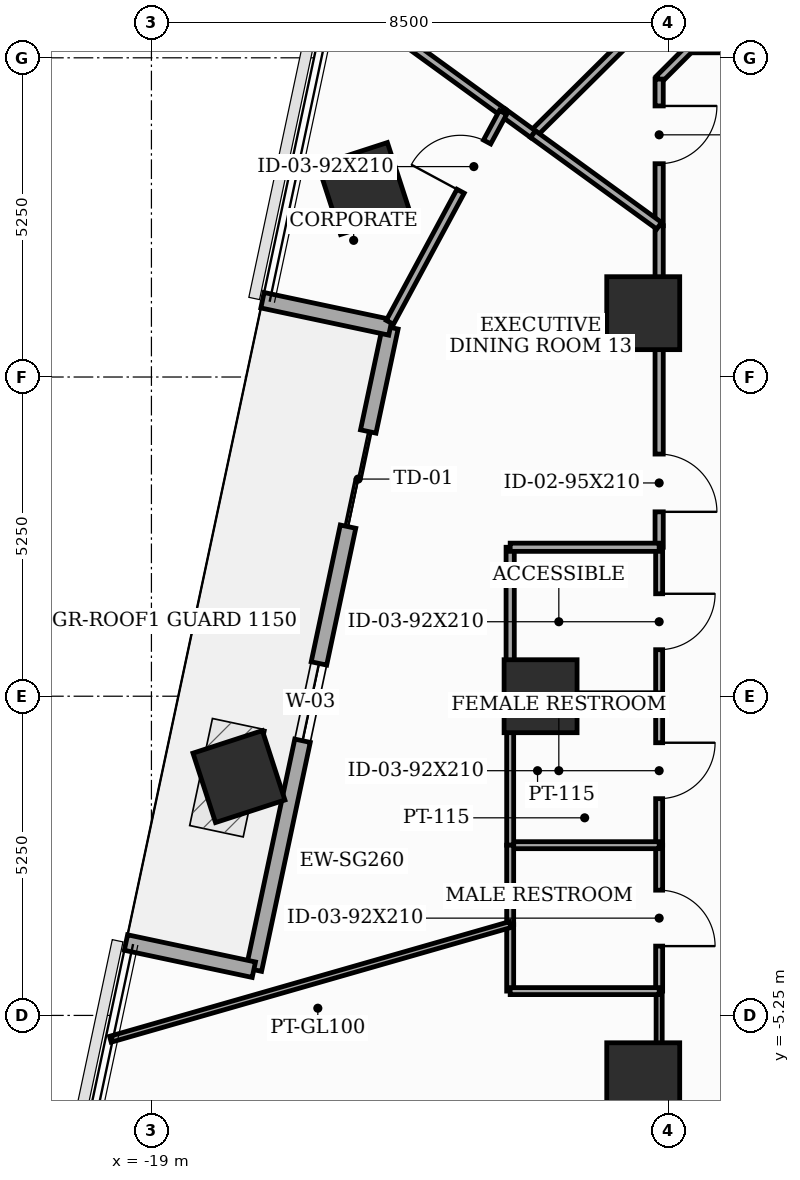
"""IFC4 building model, lengths in metres.
Left out: names, types, materials, properties, quantities, classifications, styles, units other than length and angle.
Written with IfcOpenShell. Run it as: python <this file> out.ifc"""

import sys

from ifc_helpers import new_model, si_unit, direction, frame, frame_2d, origin, origin_2d, place, context, subcontext, project, spatial, rectangle, extrude, element, fill, save


model = new_model("IFC4")
c1 = context("Model", 3, precision=1e-05, world=origin(), true_north=direction((0.0, 1.0)))
c2 = subcontext(c1, "Body", "Model", "MODEL_VIEW")
j1 = project(units=[si_unit("LENGTHUNIT", "METRE"), si_unit("PLANEANGLEUNIT", "RADIAN")], contexts=[c1])
p1 = place(None, origin())
s1 = spatial("IfcSite", under=j1, at=p1, CompositionType="ELEMENT")
p2 = place(p1, origin())
s2 = spatial("IfcBuilding", under=s1, at=p2, CompositionType="ELEMENT")
p3 = place(p2, frame((0.0, 0.0, 112.5)))
s3 = spatial("IfcBuildingStorey", under=s2, at=p3, CompositionType="ELEMENT", Elevation=112.5)
for number, where, z_axis, x_axis in (
    (1, (-10.912, 6.3, 0.0), (0.0, 0.0, 1.0), (1.0, 0.0, 0.0)),
    (2, (-12.6, 0.0, 0.0), (0.0, 0.0, 1.0), (1.0, 0.0, 0.0)),
    (3, (-10.912, -6.3, 0.0), (0.0, 0.0, 1.0), (1.0, 0.0, 0.0)),
    (4, (-15.505, 8.35, 0.0), (0.0, 0.0, 1.0), (0.951, 0.309, 0.0)),
    (5, (-17.561, -1.322, 0.0), (0.0, 0.0, 1.0), (0.951, 0.309, 0.0)),
):
    element("IfcColumn", number, at=place(p3, frame(where, z_axis=z_axis, x_axis=x_axis)), inside=s3, PredefinedType="COLUMN", context=c2, shape_type="SweptSolid", body=[
        extrude(rectangle(XDim=1.2, YDim=1.2, at=origin_2d()), origin(), (0.0, 0.0, 1.0), 3.7),
    ])
p4 = place(p3, frame((-15.07, 6.066, 0.0), z_axis=(0.0, 0.0, 1.0), x_axis=(-0.207900120229, -0.978150060067, 0.0)))
e6 = element("IfcWall", 6, at=p4, inside=s3, PredefinedType="SOLIDWALL", context=c2, shape_type="SweptSolid", body=[
    extrude(rectangle(XDim=10.8, YDim=0.26, at=frame_2d((5.4, 0.0))), origin(), (0.0, 0.0, 1.0), 3.5),
])
p5 = place(p4, frame((1.75, 0.0, 0.0)))
e7 = element("IfcOpeningElement", 7, at=p5, cuts=e6, PredefinedType="OPENING", context=c2, shape_type="SweptSolid", body=[
    extrude(rectangle(XDim=1.6, YDim=2.08, at=frame_2d((0.8, 1.04))), frame((0.0, 0.14, 0.0), z_axis=(0.0, -1.0, 0.0), x_axis=(1.0, 0.0, 0.0)), (0.0, 0.0, 1.0), 0.28),
])
p6 = place(p4, frame((5.65, 0.0, 0.85)))
e8 = element("IfcOpeningElement", 8, at=p6, cuts=e6, PredefinedType="OPENING", context=c2, shape_type="SweptSolid", body=[
    extrude(rectangle(XDim=1.3, YDim=1.25, at=frame_2d((0.65, 0.625))), frame((0.0, 0.14, 0.0), z_axis=(0.0, -1.0, 0.0), x_axis=(1.0, 0.0, 0.0)), (0.0, 0.0, 1.0), 0.28),
])
for number, where, z_axis, x_axis in (
    (9, (-17.173, 6.513, 0.0), (0.0, 0.0, 1.0), (0.978, -0.208, 0.0)),
    (10, (-17.316, -4.498, 0.0), (0.0, 0.0, 1.0), (-0.978, 0.208, 0.0)),
):
    element("IfcWall", number, at=place(p3, frame(where, z_axis=z_axis, x_axis=x_axis)), inside=s3, PredefinedType="SOLIDWALL", context=c2, shape_type="SweptSolid", body=[
        extrude(rectangle(XDim=2.15, YDim=0.26, at=frame_2d((1.075, 0.0))), origin(), (0.0, 0.0, 1.0), 3.5),
    ])
p7 = place(p3, frame((-10.65, 0.0, 0.0), z_axis=(0.0, 0.0, 1.0), x_axis=(0.0, -1.0, 0.0)))
e11 = element("IfcWall", 11, at=p7, inside=s3, PredefinedType="PARTITIONING", context=c2, shape_type="SweptSolid", body=[
    extrude(rectangle(XDim=2.45, YDim=0.115, at=frame_2d((1.225, 0.0))), origin(), (0.0, 0.0, 1.0), 2.785),
])
p8 = place(p7, frame((0.765, 0.0, 0.0)))
e12 = element("IfcOpeningElement", 12, at=p8, cuts=e11, PredefinedType="OPENING", context=c2, shape_type="SweptSolid", body=[
    extrude(rectangle(XDim=0.92, YDim=2.1, at=frame_2d((0.46, 1.05))), frame((0.0, 0.067, 0.0), z_axis=(0.0, -1.0, 0.0), x_axis=(1.0, 0.0, 0.0)), (0.0, 0.0, 1.0), 0.135),
])
p9 = place(p3, frame((-10.65, -2.45, 0.0), z_axis=(0.0, 0.0, 1.0), x_axis=(0.0, -1.0, 0.0)))
e13 = element("IfcWall", 13, at=p9, inside=s3, PredefinedType="PARTITIONING", context=c2, shape_type="SweptSolid", body=[
    extrude(rectangle(XDim=2.4, YDim=0.115, at=frame_2d((1.2, 0.0))), origin(), (0.0, 0.0, 1.0), 3.5),
])
p10 = place(p9, frame((0.74, 0.0, 0.0)))
e14 = element("IfcOpeningElement", 14, at=p10, cuts=e13, PredefinedType="OPENING", context=c2, shape_type="SweptSolid", body=[
    extrude(rectangle(XDim=0.92, YDim=2.1, at=frame_2d((0.46, 1.05))), frame((0.0, 0.067, 0.0), z_axis=(0.0, -1.0, 0.0), x_axis=(1.0, 0.0, 0.0)), (0.0, 0.0, 1.0), 0.135),
])
p11 = place(p3, frame((-10.65, -4.85, 0.0), z_axis=(0.0, 0.0, 1.0), x_axis=(0.0, -1.0, 0.0)))
e15 = element("IfcWall", 15, at=p11, inside=s3, PredefinedType="MOVABLE", context=c2, shape_type="SweptSolid", body=[
    extrude(rectangle(XDim=5.3, YDim=0.1, at=frame_2d((2.65, 0.0))), origin(), (0.0, 0.0, 1.0), 2.785),
])
p12 = place(p11, frame((3.78, 0.0, 0.0)))
e16 = element("IfcOpeningElement", 16, at=p12, cuts=e15, PredefinedType="OPENING", context=c2, shape_type="SweptSolid", body=[
    extrude(rectangle(XDim=0.92, YDim=2.1, at=frame_2d((0.46, 1.05))), frame((0.0, 0.06, 0.0), z_axis=(0.0, -1.0, 0.0), x_axis=(1.0, 0.0, 0.0)), (0.0, 0.0, 1.0), 0.12),
])
p13 = place(p3, frame((-2.655, 10.65, 0.0), z_axis=(0.0, 0.0, 1.0), x_axis=(-1.0, 0.0, 0.0)))
e17 = element("IfcWall", 17, at=p13, inside=s3, PredefinedType="PARTITIONING", context=c2, shape_type="SweptSolid", body=[
    extrude(rectangle(XDim=7.495, YDim=0.135, at=frame_2d((3.748, 0.0))), origin(), (0.0, 0.0, 1.0), 2.785),
])
p14 = place(p3, frame((-10.15, 10.65, 0.0), z_axis=(0.0, 0.0, 1.0), x_axis=(-0.707106781187, -0.707106781187, 0.0)))
e18 = element("IfcWall", 18, at=p14, inside=s3, PredefinedType="PARTITIONING", context=c2, shape_type="SweptSolid", body=[
    extrude(rectangle(XDim=0.707, YDim=0.135, at=frame_2d((0.354, 0.0))), origin(), (0.0, 0.0, 1.0), 3.5),
])
p15 = place(p3, frame((-10.65, 10.15, 0.0), z_axis=(0.0, 0.0, 1.0), x_axis=(0.0, -1.0, 0.0)))
e19 = element("IfcWall", 19, at=p15, inside=s3, PredefinedType="PARTITIONING", context=c2, shape_type="SweptSolid", body=[
    extrude(rectangle(XDim=2.412, YDim=0.135, at=frame_2d((1.206, 0.0))), origin(), (0.0, 0.0, 1.0), 3.5),
])
p16 = place(p15, frame((0.442, 0.0, 0.0)))
e20 = element("IfcOpeningElement", 20, at=p16, cuts=e19, PredefinedType="OPENING", context=c2, shape_type="SweptSolid", body=[
    extrude(rectangle(XDim=0.95, YDim=2.1, at=frame_2d((0.475, 1.05))), frame((0.0, 0.077, 0.0), z_axis=(0.0, -1.0, 0.0), x_axis=(1.0, 0.0, 0.0)), (0.0, 0.0, 1.0), 0.155),
])
p17 = place(p3, frame((-10.65, 7.738, 0.0), z_axis=(0.0, 0.0, 1.0), x_axis=(0.0, -1.0, 0.0)))
e21 = element("IfcWall", 21, at=p17, inside=s3, PredefinedType="PARTITIONING", context=c2, shape_type="SweptSolid", body=[
    extrude(rectangle(XDim=5.288, YDim=0.135, at=frame_2d((2.644, 0.0))), origin(), (0.0, 0.0, 1.0), 2.785),
])
p18 = place(p17, frame((3.755, 0.0, 0.0)))
e22 = element("IfcOpeningElement", 22, at=p18, cuts=e21, PredefinedType="OPENING", context=c2, shape_type="SweptSolid", body=[
    extrude(rectangle(XDim=0.95, YDim=2.1, at=frame_2d((0.475, 1.05))), frame((0.0, 0.077, 0.0), z_axis=(0.0, -1.0, 0.0), x_axis=(1.0, 0.0, 0.0)), (0.0, 0.0, 1.0), 0.155),
])
p19 = place(p3, frame((-10.65, 2.45, 0.0), z_axis=(0.0, 0.0, 1.0), x_axis=(0.0, -1.0, 0.0)))
e23 = element("IfcWall", 23, at=p19, inside=s3, PredefinedType="PARTITIONING", context=c2, shape_type="SweptSolid", body=[
    extrude(rectangle(XDim=2.45, YDim=0.115, at=frame_2d((1.225, 0.0))), origin(), (0.0, 0.0, 1.0), 2.785),
])
p20 = place(p19, frame((0.765, 0.0, 0.0)))
e24 = element("IfcOpeningElement", 24, at=p20, cuts=e23, PredefinedType="OPENING", context=c2, shape_type="SweptSolid", body=[
    extrude(rectangle(XDim=0.92, YDim=2.1, at=frame_2d((0.46, 1.05))), frame((0.0, 0.067, 0.0), z_axis=(0.0, -1.0, 0.0), x_axis=(1.0, 0.0, 0.0)), (0.0, 0.0, 1.0), 0.135),
])
p21 = place(p3, frame((-13.1, -2.45, 0.0), z_axis=(0.0, 0.0, 1.0), x_axis=(1.0, 0.0, 0.0)))
e25 = element("IfcWall", 25, at=p21, inside=s3, PredefinedType="PARTITIONING", context=c2, shape_type="SweptSolid", body=[
    extrude(rectangle(XDim=2.45, YDim=0.115, at=frame_2d((1.225, 0.0))), origin(), (0.0, 0.0, 1.0), 2.785),
])
p22 = place(p3, frame((-13.1, 0.0, 0.0), z_axis=(0.0, 0.0, 1.0), x_axis=(0.0, -1.0, 0.0)))
e26 = element("IfcWall", 26, at=p22, inside=s3, PredefinedType="PARTITIONING", context=c2, shape_type="SweptSolid", body=[
    extrude(rectangle(XDim=2.45, YDim=0.115, at=frame_2d((1.225, 0.0))), origin(), (0.0, 0.0, 1.0), 2.785),
])
p23 = place(p3, frame((-10.65, 0.0, 0.0), z_axis=(0.0, 0.0, 1.0), x_axis=(-1.0, 0.0, 0.0)))
e27 = element("IfcWall", 27, at=p23, inside=s3, PredefinedType="PARTITIONING", context=c2, shape_type="SweptSolid", body=[
    extrude(rectangle(XDim=2.45, YDim=0.115, at=frame_2d((1.225, 0.0))), origin(), (0.0, 0.0, 1.0), 2.785),
])
p24 = place(p3, frame((-13.1, -3.756, 0.0), z_axis=(0.0, 0.0, 1.0), x_axis=(0.0, -1.0, 0.0)))
e28 = element("IfcWall", 28, at=p24, inside=s3, PredefinedType="PARTITIONING", context=c2, shape_type="SweptSolid", body=[
    extrude(rectangle(XDim=1.094, YDim=0.115, at=frame_2d((0.547, 0.0))), origin(), (0.0, 0.0, 1.0), 3.5),
])
p25 = place(p3, frame((-13.1, -4.85, 0.0), z_axis=(0.0, 0.0, 1.0), x_axis=(1.0, 0.0, 0.0)))
e29 = element("IfcWall", 29, at=p25, inside=s3, PredefinedType="PARTITIONING", context=c2, shape_type="SweptSolid", body=[
    extrude(rectangle(XDim=2.45, YDim=0.115, at=frame_2d((1.225, 0.0))), origin(), (0.0, 0.0, 1.0), 2.785),
])
p26 = place(p3, frame((-13.1, -2.45, 0.0), z_axis=(0.0, 0.0, 1.0), x_axis=(0.0, -1.0, 0.0)))
e30 = element("IfcWall", 30, at=p26, inside=s3, PredefinedType="PARTITIONING", context=c2, shape_type="SweptSolid", body=[
    extrude(rectangle(XDim=1.306, YDim=0.115, at=frame_2d((0.653, 0.0))), origin(), (0.0, 0.0, 1.0), 3.5),
])
p27 = place(p3, frame((-13.1, -3.756, 0.0), z_axis=(0.0, 0.0, 1.0), x_axis=(-0.961255453737, -0.275659124029, 0.0)))
e31 = element("IfcWall", 31, at=p27, inside=s3, PredefinedType="MOVABLE", context=c2, shape_type="SweptSolid", body=[
    extrude(rectangle(XDim=6.84, YDim=0.1, at=frame_2d((3.42, 0.0))), origin(), (0.0, 0.0, 1.0), 2.935),
])
p28 = place(p3, frame((-12.724, 9.244, 0.0), z_axis=(0.0, 0.0, 1.0), x_axis=(0.710198472987, 0.704001512049, 0.0)))
e32 = element("IfcWall", 32, at=p28, inside=s3, PredefinedType="PARTITIONING", context=c2, shape_type="SweptSolid", body=[
    extrude(rectangle(XDim=5.476, YDim=0.135, at=frame_2d((2.738, 0.0))), origin(), (0.0, 0.0, 1.0), 3.125),
])
p29 = place(p3, frame((-16.004, 11.628, 0.0), z_axis=(0.0, 0.0, 1.0), x_axis=(0.80894744699, -0.587880964148, 0.0)))
e33 = element("IfcWall", 33, at=p29, inside=s3, PredefinedType="PARTITIONING", context=c2, shape_type="SweptSolid", body=[
    extrude(rectangle(XDim=3.446, YDim=0.135, at=frame_2d((1.723, 0.0))), origin(), (0.0, 0.0, 1.0), 2.935),
])
p30 = place(p3, frame((-13.217, 9.602, 0.0), z_axis=(0.0, 0.0, 1.0), x_axis=(0.808995913271, -0.587814266849, 0.0)))
e34 = element("IfcWall", 34, at=p30, inside=s3, PredefinedType="PARTITIONING", context=c2, shape_type="SweptSolid", body=[
    extrude(rectangle(XDim=0.609, YDim=0.135, at=frame_2d((0.305, 0.0))), origin(), (0.0, 0.0, 1.0), 3.125),
])
p31 = place(p3, frame((-12.724, 9.244, 0.0), z_axis=(0.0, 0.0, 1.0), x_axis=(0.809230060509, -0.587491880087, 0.0)))
e35 = element("IfcWall", 35, at=p31, inside=s3, PredefinedType="PARTITIONING", context=c2, shape_type="SweptSolid", body=[
    extrude(rectangle(XDim=2.563, YDim=0.135, at=frame_2d((1.282, 0.0))), origin(), (0.0, 0.0, 1.0), 3.125),
])
p32 = place(p3, frame((-15.079, 6.149, 0.0), z_axis=(0.0, 0.0, 1.0), x_axis=(0.474585971175, 0.88020915467, 0.0)))
e36 = element("IfcWall", 36, at=p32, inside=s3, PredefinedType="PARTITIONING", context=c2, shape_type="SweptSolid", body=[
    extrude(rectangle(XDim=3.923, YDim=0.135, at=frame_2d((1.961, 0.0))), origin(), (0.0, 0.0, 1.0), 2.785),
])
p33 = place(p32, frame((2.45, 0.0, 0.0)))
e37 = element("IfcOpeningElement", 37, at=p33, cuts=e36, PredefinedType="OPENING", context=c2, shape_type="SweptSolid", body=[
    extrude(rectangle(XDim=0.92, YDim=2.1, at=frame_2d((0.46, 1.05))), frame((0.0, 0.077, 0.0), z_axis=(0.0, -1.0, 0.0), x_axis=(1.0, 0.0, 0.0)), (0.0, 0.0, 1.0), 0.155),
])
p34 = place(p3, frame((-13.1, 0.0, 0.0), z_axis=(0.0, 0.0, 1.0), x_axis=(0.0, 1.0, 0.0)))
e38 = element("IfcWall", 38, at=p34, inside=s3, PredefinedType="PARTITIONING", context=c2, shape_type="SweptSolid", body=[
    extrude(rectangle(XDim=2.45, YDim=0.135, at=frame_2d((1.225, 0.0))), origin(), (0.0, 0.0, 1.0), 2.785),
])
p35 = place(p3, frame((-13.1, 2.45, 0.0), z_axis=(0.0, 0.0, 1.0), x_axis=(1.0, 0.0, 0.0)))
e39 = element("IfcWall", 39, at=p35, inside=s3, PredefinedType="PARTITIONING", context=c2, shape_type="SweptSolid", body=[
    extrude(rectangle(XDim=2.45, YDim=0.135, at=frame_2d((1.225, 0.0))), origin(), (0.0, 0.0, 1.0), 2.785),
])
p36 = place(p5, frame((1.6, 0.0, 0.0), z_axis=(0.0, 0.0, 1.0), x_axis=(-1.0, 0.0, 0.0)))
e40 = element("IfcDoor", 40, at=p36, inside=s3, OperationType="DOUBLE_DOOR_SLIDING", PredefinedType="DOOR", context=c2, shape_type="SweptSolid", body=[
    extrude(rectangle(XDim=1.6, YDim=2.08, at=frame_2d((0.8, 1.04))), frame((0.0, 0.025, 0.0), z_axis=(0.0, -1.0, 0.0), x_axis=(1.0, 0.0, 0.0)), (0.0, 0.0, 1.0), 0.05),
])
fill(e7, e40)
p37 = place(p6, origin())
e41 = element("IfcWindow", 41, at=p37, inside=s3, PartitioningType="SINGLE_PANEL", PredefinedType="WINDOW", context=c2, shape_type="SweptSolid", body=[
    extrude(rectangle(XDim=1.3, YDim=1.25, at=frame_2d((0.65, 0.625))), frame((0.0, 0.03, 0.0), z_axis=(0.0, -1.0, 0.0), x_axis=(1.0, 0.0, 0.0)), (0.0, 0.0, 1.0), 0.06),
])
fill(e8, e41)
p38 = place(p8, origin())
e42 = element("IfcDoor", 42, at=p38, inside=s3, OperationType="SINGLE_SWING_LEFT", PredefinedType="DOOR", context=c2, shape_type="SweptSolid", body=[
    extrude(rectangle(XDim=0.92, YDim=2.1, at=frame_2d((0.46, 1.05))), frame((0.0, 0.025, 0.0), z_axis=(0.0, -1.0, 0.0), x_axis=(1.0, 0.0, 0.0)), (0.0, 0.0, 1.0), 0.05),
])
fill(e12, e42)
p39 = place(p10, origin())
e43 = element("IfcDoor", 43, at=p39, inside=s3, OperationType="SINGLE_SWING_RIGHT", PredefinedType="DOOR", context=c2, shape_type="SweptSolid", body=[
    extrude(rectangle(XDim=0.92, YDim=2.1, at=frame_2d((0.46, 1.05))), frame((0.0, 0.025, 0.0), z_axis=(0.0, -1.0, 0.0), x_axis=(1.0, 0.0, 0.0)), (0.0, 0.0, 1.0), 0.05),
])
fill(e14, e43)
p40 = place(p16, origin())
e44 = element("IfcDoor", 44, at=p40, inside=s3, OperationType="SINGLE_SWING_LEFT", PredefinedType="DOOR", context=c2, shape_type="SweptSolid", body=[
    extrude(rectangle(XDim=0.95, YDim=2.1, at=frame_2d((0.475, 1.05))), frame((0.0, 0.025, 0.0), z_axis=(0.0, -1.0, 0.0), x_axis=(1.0, 0.0, 0.0)), (0.0, 0.0, 1.0), 0.05),
])
fill(e20, e44)
p41 = place(p18, origin())
e45 = element("IfcDoor", 45, at=p41, inside=s3, OperationType="SINGLE_SWING_RIGHT", PredefinedType="DOOR", context=c2, shape_type="SweptSolid", body=[
    extrude(rectangle(XDim=0.95, YDim=2.1, at=frame_2d((0.475, 1.05))), frame((0.0, 0.025, 0.0), z_axis=(0.0, -1.0, 0.0), x_axis=(1.0, 0.0, 0.0)), (0.0, 0.0, 1.0), 0.05),
])
fill(e22, e45)
p42 = place(p20, origin())
e46 = element("IfcDoor", 46, at=p42, inside=s3, OperationType="SINGLE_SWING_LEFT", PredefinedType="DOOR", context=c2, shape_type="SweptSolid", body=[
    extrude(rectangle(XDim=0.92, YDim=2.1, at=frame_2d((0.46, 1.05))), frame((0.0, 0.025, 0.0), z_axis=(0.0, -1.0, 0.0), x_axis=(1.0, 0.0, 0.0)), (0.0, 0.0, 1.0), 0.05),
])
fill(e24, e46)
p43 = place(p33, origin())
e47 = element("IfcDoor", 47, at=p43, inside=s3, OperationType="SINGLE_SWING_LEFT", PredefinedType="DOOR", context=c2, shape_type="SweptSolid", body=[
    extrude(rectangle(XDim=0.92, YDim=2.1, at=frame_2d((0.46, 1.05))), frame((0.0, 0.025, 0.0), z_axis=(0.0, -1.0, 0.0), x_axis=(1.0, 0.0, 0.0)), (0.0, 0.0, 1.0), 0.05),
])
fill(e37, e47)
save(model, sys.argv[1])
